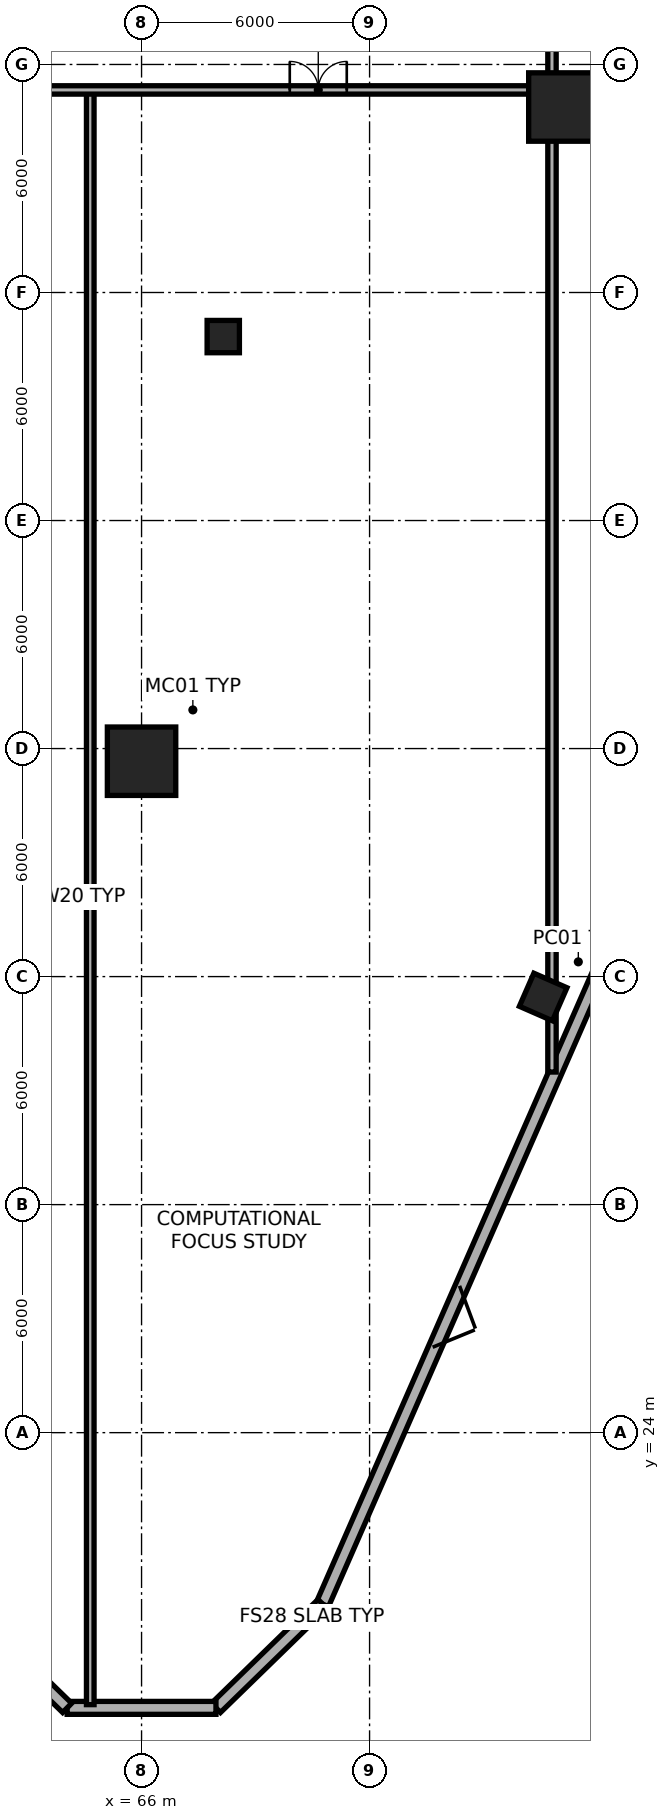
"""IFC4 building model, lengths in metres.
Left out: names, types, materials, properties, quantities, classifications, styles, units other than length and angle.
Written with IfcOpenShell. Run it as: python <this file> out.ifc"""

import sys

from ifc_helpers import new_model, si_unit, direction, frame, frame_2d, origin, origin_2d, place, context, subcontext, project, spatial, rectangle, extrude, element, fill, save


model = new_model("IFC4")
c1 = context("Model", 3, precision=1e-05, world=origin(), true_north=direction((0.0, 1.0)))
c2 = subcontext(c1, "Body", "Model", "MODEL_VIEW")
j1 = project(units=[si_unit("LENGTHUNIT", "METRE"), si_unit("PLANEANGLEUNIT", "RADIAN")], contexts=[c1])
p1 = place(None, origin())
s1 = spatial("IfcSite", under=j1, at=p1, CompositionType="ELEMENT")
p2 = place(p1, origin())
s2 = spatial("IfcBuilding", under=s1, at=p2, CompositionType="ELEMENT")
p3 = place(p2, frame((0.0, 0.0, 44.7)))
s3 = spatial("IfcBuildingStorey", under=s2, at=p3, CompositionType="ELEMENT", Elevation=44.7)
p4 = place(p3, frame((68.15, 52.84, 0.0), z_axis=(0.0, 0.0, 1.0), x_axis=(1.0, 0.0, 0.0)))
e1 = element("IfcColumn", 1, at=p4, inside=s3, PredefinedType="COLUMN", context=c2, shape_type="SweptSolid", body=[
    extrude(rectangle(XDim=0.85, YDim=0.85, at=origin_2d()), origin(), (0.0, 0.0, 1.0), 3.65),
])
for number, where, z_axis, x_axis in (
    (2, (66.0, 41.667, 0.0), (0.0, 0.0, 1.0), (1.0, 0.0, 0.0)),
    (3, (77.086, 58.88, 0.0), (0.0, 0.0, 1.0), (1.0, 0.0, 0.0)),
):
    element("IfcColumn", number, at=place(p3, frame(where, z_axis=z_axis, x_axis=x_axis)), inside=s3, PredefinedType="COLUMN", context=c2, shape_type="SweptSolid", body=[
        extrude(rectangle(XDim=1.8, YDim=1.8, at=origin_2d()), origin(), (0.0, 0.0, 1.0), 3.65),
    ])
p5 = place(p3, frame((76.591, 35.363, 0.003), z_axis=(-0.012375141264, 0.054450621561, 0.998439775695), x_axis=(-0.188482061822, -0.98074372261, 0.051149417712)))
e4 = element("IfcColumn", 4, at=p5, inside=s3, PredefinedType="COLUMN", context=c2, shape_type="SweptSolid", body=[
    extrude(rectangle(XDim=0.95, YDim=0.95, at=origin_2d()), origin(), (0.0, 0.0, 1.0), 3.65),
])
p6 = place(p3, frame((82.677, 46.7, 0.0), z_axis=(0.0, 0.0, 1.0), x_axis=(-0.401096058092, -0.916035999393, 0.0)))
e5 = element("IfcWall", 5, at=p6, inside=s3, PredefinedType="STANDARD", context=c2, shape_type="SweptSolid", body=[
    extrude(rectangle(XDim=29.704, YDim=0.34, at=frame_2d((14.852, 0.0))), origin(), (0.0, 0.0, 1.0), 0.85),
])
p7 = place(p3, frame((70.763, 19.49, 0.0), z_axis=(0.0, 0.0, 1.0), x_axis=(-0.716458886532, -0.697629316979, 0.0)))
e6 = element("IfcWall", 6, at=p7, inside=s3, PredefinedType="STANDARD", context=c2, shape_type="SweptSolid", body=[
    extrude(rectangle(XDim=3.916, YDim=0.34, at=frame_2d((1.958, 0.0))), origin(), (0.0, 0.0, 1.0), 3.375),
])
p8 = place(p3, frame((67.958, 16.758, 0.0), z_axis=(0.0, 0.0, 1.0), x_axis=(-1.0, 0.0, 0.0)))
e7 = element("IfcWall", 7, at=p8, inside=s3, PredefinedType="STANDARD", context=c2, shape_type="SweptSolid", body=[
    extrude(rectangle(XDim=3.916, YDim=0.34, at=frame_2d((1.958, 0.0))), origin(), (0.0, 0.0, 1.0), 3.375),
])
p9 = place(p3, frame((64.042, 16.758, 0.0), z_axis=(0.0, 0.0, 1.0), x_axis=(-0.716458886532, 0.697629316979, 0.0)))
e8 = element("IfcWall", 8, at=p9, inside=s3, PredefinedType="STANDARD", context=c2, shape_type="SweptSolid", body=[
    extrude(rectangle(XDim=3.916, YDim=0.34, at=frame_2d((1.958, 0.0))), origin(), (0.0, 0.0, 1.0), 3.375),
])
p10 = place(p3, frame((64.65, 16.844, 0.0), z_axis=(0.0, 0.0, 1.0), x_axis=(0.0, 1.0, 0.0)))
e9 = element("IfcWall", 9, at=p10, inside=s3, PredefinedType="PARTITIONING", context=c2, shape_type="SweptSolid", body=[
    extrude(rectangle(XDim=42.487, YDim=0.2, at=frame_2d((21.243, 0.0))), origin(), (0.0, 0.0, 1.0), 2.505),
])
p11 = place(p3, frame((43.885, 59.33, 0.0), z_axis=(0.0, 0.0, 1.0), x_axis=(1.0, 0.0, 0.0)))
e10 = element("IfcWall", 10, at=p11, inside=s3, PredefinedType="PARTITIONING", context=c2, shape_type="SweptSolid", body=[
    extrude(rectangle(XDim=32.915, YDim=0.22, at=frame_2d((16.458, 0.0))), origin(), (0.0, 0.0, 1.0), 2.505),
])
p12 = place(p11, frame((6.921, 0.0, 0.0)))
e11 = element("IfcOpeningElement", 11, at=p12, cuts=e10, PredefinedType="OPENING", context=c2, shape_type="SweptSolid", body=[
    extrude(rectangle(XDim=1.5, YDim=2.2, at=frame_2d((0.75, 1.1))), frame((0.0, 0.12, 0.0), z_axis=(0.0, -1.0, 0.0), x_axis=(1.0, 0.0, 0.0)), (0.0, 0.0, 1.0), 0.24),
])
p13 = place(p11, frame((26.015, 0.0, 0.0)))
e12 = element("IfcOpeningElement", 12, at=p13, cuts=e10, PredefinedType="OPENING", context=c2, shape_type="SweptSolid", body=[
    extrude(rectangle(XDim=1.5, YDim=2.2, at=frame_2d((0.75, 1.1))), frame((0.0, 0.12, 0.0), z_axis=(0.0, -1.0, 0.0), x_axis=(1.0, 0.0, 0.0)), (0.0, 0.0, 1.0), 0.24),
])
p14 = place(p3, frame((76.8, 33.489, 0.0), z_axis=(0.0, 0.0, 1.0), x_axis=(0.0, 1.0, 0.0)))
e13 = element("IfcWall", 13, at=p14, inside=s3, PredefinedType="PARTITIONING", context=c2, shape_type="SweptSolid", body=[
    extrude(rectangle(XDim=43.181, YDim=0.22, at=frame_2d((21.591, 0.0))), origin(), (0.0, 0.0, 1.0), 2.505),
])
p15 = place(p14, frame((29.651, 0.0, 0.0)))
e14 = element("IfcOpeningElement", 14, at=p15, cuts=e13, PredefinedType="OPENING", context=c2, shape_type="SweptSolid", body=[
    extrude(rectangle(XDim=1.05, YDim=2.15, at=frame_2d((0.525, 1.075))), frame((0.0, 0.12, 0.0), z_axis=(0.0, -1.0, 0.0), x_axis=(1.0, 0.0, 0.0)), (0.0, 0.0, 1.0), 0.24),
])
p16 = place(p14, frame((38.321, 0.0, 0.0)))
e15 = element("IfcOpeningElement", 15, at=p16, cuts=e13, PredefinedType="OPENING", context=c2, shape_type="SweptSolid", body=[
    extrude(rectangle(XDim=1.05, YDim=2.15, at=frame_2d((0.525, 1.075))), frame((0.0, 0.12, 0.0), z_axis=(0.0, -1.0, 0.0), x_axis=(1.0, 0.0, 0.0)), (0.0, 0.0, 1.0), 0.24),
])
p17 = place(p13, origin())
e16 = element("IfcDoor", 16, at=p17, inside=s3, OperationType="DOUBLE_DOOR_SINGLE_SWING", PredefinedType="DOOR", context=c2, shape_type="SweptSolid", body=[
    extrude(rectangle(XDim=1.5, YDim=2.2, at=frame_2d((0.75, 1.1))), frame((0.0, 0.025, 0.0), z_axis=(0.0, -1.0, 0.0), x_axis=(1.0, 0.0, 0.0)), (0.0, 0.0, 1.0), 0.05),
])
fill(e12, e16)
save(model, sys.argv[1])
